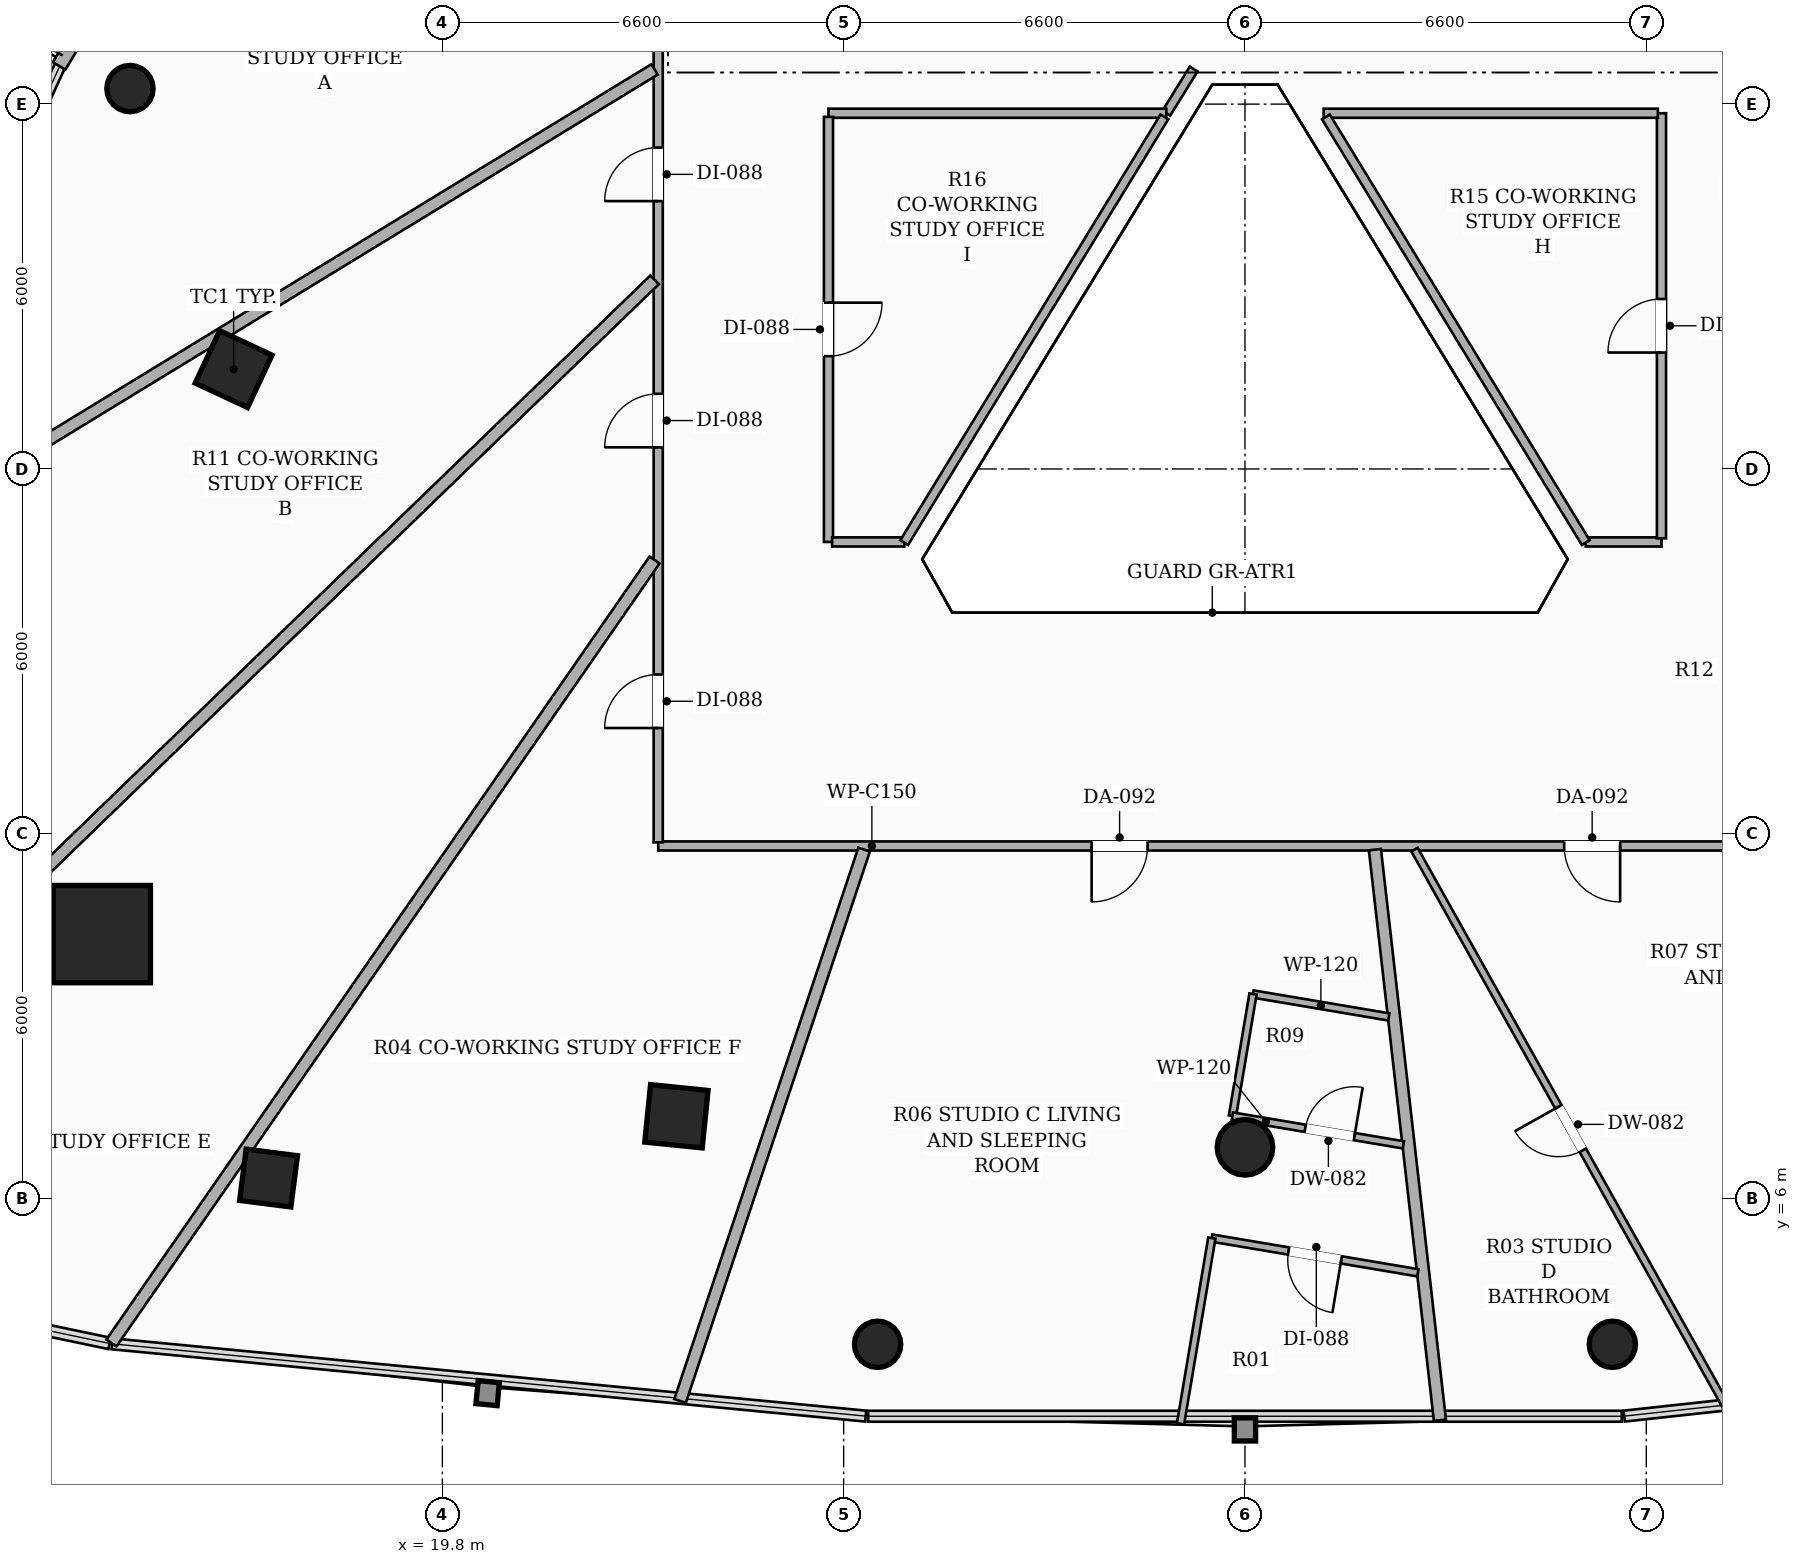
"""IFC4 building model, lengths in metres.
Left out: names, types, materials, properties, quantities, classifications, styles, units other than length and angle.
Written with IfcOpenShell. Run it as: python <this file> out.ifc"""

import sys

from ifc_helpers import new_model, si_unit, direction, frame, frame_2d, origin, origin_2d, place, context, subcontext, project, spatial, rectangle, hollow_rectangle, hollow_circle, extrude, element, fill, save


model = new_model("IFC4")
c1 = context("Model", 3, precision=1e-05, world=origin(), true_north=direction((0.0, 1.0)))
c2 = subcontext(c1, "Body", "Model", "MODEL_VIEW")
j1 = project(units=[si_unit("LENGTHUNIT", "METRE"), si_unit("PLANEANGLEUNIT", "RADIAN")], contexts=[c1])
p1 = place(None, origin())
s1 = spatial("IfcSite", under=j1, at=p1, CompositionType="ELEMENT")
p2 = place(p1, origin())
s2 = spatial("IfcBuilding", under=s1, at=p2, CompositionType="ELEMENT")
p3 = place(p2, frame((0.0, 0.0, 90.65)))
s3 = spatial("IfcBuildingStorey", under=s2, at=p3, CompositionType="ELEMENT", Elevation=90.65)
p4 = place(p3, frame((14.199, 10.351, 0.0), z_axis=(0.0, 0.0, 1.0), x_axis=(1.0, 0.0, 0.0)))
e1 = element("IfcColumn", 1, at=p4, inside=s3, PredefinedType="COLUMN", context=c2, shape_type="SweptSolid", body=[
    extrude(hollow_rectangle(XDim=1.6, YDim=1.6, WallThickness=0.05, at=origin_2d()), origin(), (0.0, 0.0, 1.0), 3.3),
])
for number, where, z_axis, x_axis in (
    (2, (16.367, 19.642, 0.0), (0.0, 0.0, 1.0), (0.423, 0.906, 0.0)),
    (3, (23.649, 7.355, 0.0), (0.0, 0.0, 1.0), (-0.995, 0.101, 0.0)),
):
    element("IfcColumn", number, at=place(p3, frame(where, z_axis=z_axis, x_axis=x_axis)), inside=s3, PredefinedType="COLUMN", context=c2, shape_type="SweptSolid", body=[
        extrude(hollow_rectangle(XDim=0.95, YDim=0.95, WallThickness=0.032, at=origin_2d()), origin(), (0.0, 0.0, 1.0), 3.3),
    ])
p5 = place(p3, frame((33.0, 6.844, 0.0), z_axis=(0.0, 0.0, 1.0), x_axis=(1.0, 0.0, 0.0)))
e4 = element("IfcColumn", 4, at=p5, inside=s3, PredefinedType="COLUMN", context=c2, shape_type="SweptSolid", body=[
    extrude(hollow_circle(Radius=0.457, WallThickness=0.025, at=origin_2d()), origin(), (0.0, 0.0, 1.0), 3.3),
])
p6 = place(p3, frame((16.941, 6.339, 0.0), z_axis=(0.0, 0.0, 1.0), x_axis=(-0.99189444259, 0.127064608601, 0.0)))
e5 = element("IfcColumn", 5, at=p6, inside=s3, PredefinedType="COLUMN", context=c2, shape_type="SweptSolid", body=[
    extrude(hollow_rectangle(XDim=0.85, YDim=0.85, WallThickness=0.028, at=origin_2d()), origin(), (0.0, 0.0, 1.0), 3.3),
])
for number, where, z_axis, x_axis in (
    (6, (14.662, 24.256, 0.0), (0.0, 0.0, 1.0), (1.0, 0.0, 0.0)),
    (7, (26.958, 3.605, 0.0), (0.0, 0.0, 1.0), (1.0, 0.0, 0.0)),
    (8, (39.042, 3.605, 0.0), (0.0, 0.0, 1.0), (1.0, 0.0, 0.0)),
):
    element("IfcColumn", number, at=place(p3, frame(where, z_axis=z_axis, x_axis=x_axis)), inside=s3, PredefinedType="COLUMN", context=c2, shape_type="SweptSolid", body=[
        extrude(hollow_circle(Radius=0.381, WallThickness=0.022, at=origin_2d()), origin(), (0.0, 0.0, 1.0), 3.3),
    ])
p7 = place(p3, frame((19.783, 35.108, 0.0), z_axis=(0.0, 0.0, 1.0), x_axis=(-0.514369419392, -0.857568714678, 0.0)))
e9 = element("IfcWall", 9, at=p7, inside=s3, PredefinedType="SOLIDWALL", context=c2, shape_type="SweptSolid", body=[
    extrude(rectangle(XDim=12.22, YDim=0.24, at=frame_2d((6.11, 0.0))), origin(), (0.0, 0.0, 1.0), 2.624),
])
p8 = place(p7, frame((9.723, 0.0, 0.0)))
e10 = element("IfcOpeningElement", 10, at=p8, cuts=e9, PredefinedType="OPENING", context=c2, shape_type="SweptSolid", body=[
    extrude(rectangle(XDim=1.8, YDim=2.2, at=frame_2d((0.9, 1.1))), frame((0.0, 0.13, 0.0), z_axis=(0.0, -1.0, 0.0), x_axis=(1.0, 0.0, 0.0)), (0.0, 0.0, 1.0), 0.26),
])
p9 = place(p3, frame((42.59, 11.8, 0.0), z_axis=(0.0, 0.0, 1.0), x_axis=(-1.0, 0.0, 0.0)))
e11 = element("IfcWall", 11, at=p9, inside=s3, PredefinedType="PARTITIONING", context=c2, shape_type="SweptSolid", body=[
    extrude(rectangle(XDim=19.24, YDim=0.15, at=frame_2d((9.62, 0.0))), origin(), (0.0, 0.0, 1.0), 2.669),
])
p10 = place(p9, frame((11.192, 0.0, 0.0)))
e12 = element("IfcOpeningElement", 12, at=p10, cuts=e11, PredefinedType="OPENING", context=c2, shape_type="SweptSolid", body=[
    extrude(rectangle(XDim=0.92, YDim=2.15, at=frame_2d((0.46, 1.075))), frame((0.0, 0.085, 0.0), z_axis=(0.0, -1.0, 0.0), x_axis=(1.0, 0.0, 0.0)), (0.0, 0.0, 1.0), 0.17),
])
p11 = place(p9, frame((3.42, 0.0, 0.0)))
e13 = element("IfcOpeningElement", 13, at=p11, cuts=e11, PredefinedType="OPENING", context=c2, shape_type="SweptSolid", body=[
    extrude(rectangle(XDim=0.92, YDim=2.15, at=frame_2d((0.46, 1.075))), frame((0.0, 0.085, 0.0), z_axis=(0.0, -1.0, 0.0), x_axis=(1.0, 0.0, 0.0)), (0.0, 0.0, 1.0), 0.17),
])
p12 = place(p3, frame((23.35, 11.86, 0.0), z_axis=(0.0, 0.0, 1.0), x_axis=(0.0, 1.0, 0.0)))
e14 = element("IfcWall", 14, at=p12, inside=s3, PredefinedType="PARTITIONING", context=c2, shape_type="SweptSolid", body=[
    extrude(rectangle(XDim=25.04, YDim=0.15, at=frame_2d((12.52, 0.0))), origin(), (0.0, 0.0, 1.0), 2.413),
])
p13 = place(p12, frame((18.285, 0.0, 0.0)))
e15 = element("IfcOpeningElement", 15, at=p13, cuts=e14, PredefinedType="OPENING", context=c2, shape_type="SweptSolid", body=[
    extrude(rectangle(XDim=0.88, YDim=2.1, at=frame_2d((0.44, 1.05))), frame((0.0, 0.085, 0.0), z_axis=(0.0, -1.0, 0.0), x_axis=(1.0, 0.0, 0.0)), (0.0, 0.0, 1.0), 0.17),
])
p14 = place(p12, frame((10.545, 0.0, 0.0)))
e16 = element("IfcOpeningElement", 16, at=p14, cuts=e14, PredefinedType="OPENING", context=c2, shape_type="SweptSolid", body=[
    extrude(rectangle(XDim=0.88, YDim=2.1, at=frame_2d((0.44, 1.05))), frame((0.0, 0.085, 0.0), z_axis=(0.0, -1.0, 0.0), x_axis=(1.0, 0.0, 0.0)), (0.0, 0.0, 1.0), 0.17),
])
p15 = place(p12, frame((6.496, 0.0, 0.0)))
e17 = element("IfcOpeningElement", 17, at=p15, cuts=e14, PredefinedType="OPENING", context=c2, shape_type="SweptSolid", body=[
    extrude(rectangle(XDim=0.88, YDim=2.1, at=frame_2d((0.44, 1.05))), frame((0.0, 0.085, 0.0), z_axis=(0.0, -1.0, 0.0), x_axis=(1.0, 0.0, 0.0)), (0.0, 0.0, 1.0), 0.17),
])
p16 = place(p12, frame((1.88, 0.0, 0.0)))
e18 = element("IfcOpeningElement", 18, at=p16, cuts=e14, PredefinedType="OPENING", context=c2, shape_type="SweptSolid", body=[
    extrude(rectangle(XDim=0.88, YDim=2.1, at=frame_2d((0.44, 1.05))), frame((0.0, 0.085, 0.0), z_axis=(0.0, -1.0, 0.0), x_axis=(1.0, 0.0, 0.0)), (0.0, 0.0, 1.0), 0.17),
])
p17 = place(p3, frame((32.156, 24.577, 0.0), z_axis=(0.0, 0.0, 1.0), x_axis=(-0.526374279241, -0.850252973034, 0.0)))
e19 = element("IfcWall", 19, at=p17, inside=s3, PredefinedType="PARTITIONING", context=c2, shape_type="SweptSolid", body=[
    extrude(rectangle(XDim=0.855, YDim=0.15, at=frame_2d((0.427, 0.0))), origin(), (0.0, 0.0, 1.0), 3.06),
])
p18 = place(p3, frame((31.706, 23.85, 0.0), z_axis=(0.0, 0.0, 1.0), x_axis=(-1.0, 0.0, 0.0)))
e20 = element("IfcWall", 20, at=p18, inside=s3, PredefinedType="PARTITIONING", context=c2, shape_type="SweptSolid", body=[
    extrude(rectangle(XDim=5.556, YDim=0.15, at=frame_2d((2.778, 0.0))), origin(), (0.0, 0.0, 1.0), 2.669),
])
p19 = place(p3, frame((26.15, 23.79, 0.0), z_axis=(0.0, 0.0, 1.0), x_axis=(0.0, -1.0, 0.0)))
e21 = element("IfcWall", 21, at=p19, inside=s3, PredefinedType="PARTITIONING", context=c2, shape_type="SweptSolid", body=[
    extrude(rectangle(XDim=6.99, YDim=0.15, at=frame_2d((3.495, 0.0))), origin(), (0.0, 0.0, 1.0), 2.669),
])
p20 = place(p19, frame((3.055, 0.0, 0.0)))
e22 = element("IfcOpeningElement", 22, at=p20, cuts=e21, PredefinedType="OPENING", context=c2, shape_type="SweptSolid", body=[
    extrude(rectangle(XDim=0.88, YDim=2.1, at=frame_2d((0.44, 1.05))), frame((0.0, 0.085, 0.0), z_axis=(0.0, -1.0, 0.0), x_axis=(1.0, 0.0, 0.0)), (0.0, 0.0, 1.0), 0.17),
])
p21 = place(p3, frame((26.21, 16.8, 0.0), z_axis=(0.0, 0.0, 1.0), x_axis=(1.0, 0.0, 0.0)))
e23 = element("IfcWall", 23, at=p21, inside=s3, PredefinedType="PARTITIONING", context=c2, shape_type="SweptSolid", body=[
    extrude(rectangle(XDim=1.186, YDim=0.15, at=frame_2d((0.593, 0.0))), origin(), (0.0, 0.0, 1.0), 3.06),
])
p22 = place(p3, frame((38.604, 16.8, 0.0), z_axis=(0.0, 0.0, 1.0), x_axis=(1.0, 0.0, 0.0)))
e24 = element("IfcWall", 24, at=p22, inside=s3, PredefinedType="PARTITIONING", context=c2, shape_type="SweptSolid", body=[
    extrude(rectangle(XDim=1.246, YDim=0.15, at=frame_2d((0.623, 0.0))), origin(), (0.0, 0.0, 1.0), 3.06),
])
p23 = place(p3, frame((39.85, 16.86, 0.0), z_axis=(0.0, 0.0, 1.0), x_axis=(0.0, 1.0, 0.0)))
e25 = element("IfcWall", 25, at=p23, inside=s3, PredefinedType="PARTITIONING", context=c2, shape_type="SweptSolid", body=[
    extrude(rectangle(XDim=6.99, YDim=0.15, at=frame_2d((3.495, 0.0))), origin(), (0.0, 0.0, 1.0), 2.669),
])
p24 = place(p23, frame((3.055, 0.0, 0.0)))
e26 = element("IfcOpeningElement", 26, at=p24, cuts=e25, PredefinedType="OPENING", context=c2, shape_type="SweptSolid", body=[
    extrude(rectangle(XDim=0.88, YDim=2.1, at=frame_2d((0.44, 1.05))), frame((0.0, 0.085, 0.0), z_axis=(0.0, -1.0, 0.0), x_axis=(1.0, 0.0, 0.0)), (0.0, 0.0, 1.0), 0.17),
])
p25 = place(p3, frame((39.79, 23.85, 0.0), z_axis=(0.0, 0.0, 1.0), x_axis=(-1.0, 0.0, 0.0)))
e27 = element("IfcWall", 27, at=p25, inside=s3, PredefinedType="PARTITIONING", context=c2, shape_type="SweptSolid", body=[
    extrude(rectangle(XDim=5.496, YDim=0.15, at=frame_2d((2.748, 0.0))), origin(), (0.0, 0.0, 1.0), 2.669),
])
p26 = place(p3, frame((27.396, 16.79, 0.0), z_axis=(0.0, 0.0, 1.0), x_axis=(0.521563150989, 0.8532126813, 0.0)))
e28 = element("IfcWall", 28, at=p26, inside=s3, PredefinedType="PARTITIONING", context=c2, shape_type="SweptSolid", body=[
    extrude(rectangle(XDim=8.204, YDim=0.15, at=frame_2d((4.102, 0.0))), origin(), (0.0, 0.0, 1.0), 2.669),
])
p27 = place(p3, frame((34.331, 23.79, 0.0), z_axis=(0.0, 0.0, 1.0), x_axis=(0.52102126657, -0.853543695297, 0.0)))
e29 = element("IfcWall", 29, at=p27, inside=s3, PredefinedType="PARTITIONING", context=c2, shape_type="SweptSolid", body=[
    extrude(rectangle(XDim=8.201, YDim=0.15, at=frame_2d((4.101, 0.0))), origin(), (0.0, 0.0, 1.0), 2.669),
])
p28 = place(p3, frame((23.29, 24.571, 0.0), z_axis=(0.0, 0.0, 1.0), x_axis=(-0.85350412057, -0.521086092858, 0.0)))
e30 = element("IfcWall", 30, at=p28, inside=s3, PredefinedType="PARTITIONING", context=c2, shape_type="SweptSolid", body=[
    extrude(rectangle(XDim=16.23, YDim=0.2, at=frame_2d((8.115, 0.0))), origin(), (0.0, 0.0, 1.0), 2.413),
])
p29 = place(p3, frame((23.29, 21.11, 0.0), z_axis=(0.0, 0.0, 1.0), x_axis=(-0.718846392138, -0.695168946739, 0.0)))
e31 = element("IfcWall", 31, at=p29, inside=s3, PredefinedType="PARTITIONING", context=c2, shape_type="SweptSolid", body=[
    extrude(rectangle(XDim=22.973, YDim=0.2, at=frame_2d((11.487, 0.0))), origin(), (0.0, 0.0, 1.0), 2.413),
])
p30 = place(p3, frame((35.137, 11.74, 0.0), z_axis=(0.0, 0.0, 1.0), x_axis=(0.113194461651, -0.993572852815, 0.0)))
e32 = element("IfcWall", 32, at=p30, inside=s3, PredefinedType="PARTITIONING", context=c2, shape_type="SweptSolid", body=[
    extrude(rectangle(XDim=9.445, YDim=0.2, at=frame_2d((4.722, 0.0))), origin(), (0.0, 0.0, 1.0), 2.413),
])
p31 = place(p3, frame((23.709, 2.673, 0.0), z_axis=(0.0, 0.0, 1.0), x_axis=(0.316679801448, 0.948532499894, 0.0)))
e33 = element("IfcWall", 33, at=p31, inside=s3, PredefinedType="PARTITIONING", context=c2, shape_type="SweptSolid", body=[
    extrude(rectangle(XDim=9.559, YDim=0.2, at=frame_2d((4.779, 0.0))), origin(), (0.0, 0.0, 1.0), 2.413),
])
p32 = place(p3, frame((23.29, 16.503, 0.0), z_axis=(0.0, 0.0, 1.0), x_axis=(-0.57002789499, -0.821625339759, 0.0)))
e34 = element("IfcWall", 34, at=p32, inside=s3, PredefinedType="PARTITIONING", context=c2, shape_type="SweptSolid", body=[
    extrude(rectangle(XDim=15.671, YDim=0.2, at=frame_2d((7.836, 0.0))), origin(), (0.0, 0.0, 1.0), 2.413),
])
p33 = place(p3, frame((35.365, 8.989, 0.0), z_axis=(0.0, 0.0, 1.0), x_axis=(-0.986047933852, 0.166461623646, 0.0)))
e35 = element("IfcWall", 35, at=p33, inside=s3, PredefinedType="PARTITIONING", context=c2, shape_type="SweptSolid", body=[
    extrude(rectangle(XDim=2.264, YDim=0.12, at=frame_2d((1.132, 0.0))), origin(), (0.0, 0.0, 1.0), 2.669),
])
p34 = place(p3, frame((33.132, 9.366, 0.0), z_axis=(0.0, 0.0, 1.0), x_axis=(-0.166129895483, -0.986103877807, 0.0)))
e36 = element("IfcWall", 36, at=p34, inside=s3, PredefinedType="PARTITIONING", context=c2, shape_type="SweptSolid", body=[
    extrude(rectangle(XDim=2.035, YDim=0.12, at=frame_2d((1.018, 0.0))), origin(), (0.0, 0.0, 1.0), 2.669),
])
p35 = place(p3, frame((32.794, 7.359, 0.0), z_axis=(0.0, 0.0, 1.0), x_axis=(0.986086685245, -0.166231913849, 0.0)))
e37 = element("IfcWall", 37, at=p35, inside=s3, PredefinedType="PARTITIONING", context=c2, shape_type="SweptSolid", body=[
    extrude(rectangle(XDim=2.851, YDim=0.12, at=frame_2d((1.425, 0.0))), origin(), (0.0, 0.0, 1.0), 2.669),
])
p36 = place(p35, frame((1.214, 0.0, 0.0)))
e38 = element("IfcOpeningElement", 38, at=p36, cuts=e37, PredefinedType="OPENING", context=c2, shape_type="SweptSolid", body=[
    extrude(rectangle(XDim=0.82, YDim=2.1, at=frame_2d((0.41, 1.05))), frame((0.0, 0.07, 0.0), z_axis=(0.0, -1.0, 0.0), x_axis=(1.0, 0.0, 0.0)), (0.0, 0.0, 1.0), 0.14),
])
p37 = place(p3, frame((35.844, 4.781, 0.0), z_axis=(0.0, 0.0, 1.0), x_axis=(-0.986098591399, 0.166161271182, 0.0)))
e39 = element("IfcWall", 39, at=p37, inside=s3, PredefinedType="PARTITIONING", context=c2, shape_type="SweptSolid", body=[
    extrude(rectangle(XDim=3.437, YDim=0.12, at=frame_2d((1.718, 0.0))), origin(), (0.0, 0.0, 1.0), 3.06),
])
p38 = place(p37, frame((1.278, 0.0, 0.0)))
e40 = element("IfcOpeningElement", 40, at=p38, cuts=e39, PredefinedType="OPENING", context=c2, shape_type="SweptSolid", body=[
    extrude(rectangle(XDim=0.88, YDim=2.1, at=frame_2d((0.44, 1.05))), frame((0.0, 0.07, 0.0), z_axis=(0.0, -1.0, 0.0), x_axis=(1.0, 0.0, 0.0)), (0.0, 0.0, 1.0), 0.14),
])
p39 = place(p3, frame((32.455, 5.352, 0.0), z_axis=(0.0, 0.0, 1.0), x_axis=(-0.166328914583, -0.986070328209, 0.0)))
e41 = element("IfcWall", 41, at=p39, inside=s3, PredefinedType="PARTITIONING", context=c2, shape_type="SweptSolid", body=[
    extrude(rectangle(XDim=3.097, YDim=0.12, at=frame_2d((1.549, 0.0))), origin(), (0.0, 0.0, 1.0), 3.06),
])
p40 = place(p3, frame((40.923, 2.567, 0.0), z_axis=(0.0, 0.0, 1.0), x_axis=(-0.4884640488, 0.872584020613, 0.0)))
e42 = element("IfcWall", 42, at=p40, inside=s3, PredefinedType="PARTITIONING", context=c2, shape_type="SweptSolid", body=[
    extrude(rectangle(XDim=10.512, YDim=0.12, at=frame_2d((5.256, 0.0))), origin(), (0.0, 0.0, 1.0), 2.413),
])
p41 = place(p40, frame((4.846, 0.0, 0.0)))
e43 = element("IfcOpeningElement", 43, at=p41, cuts=e42, PredefinedType="OPENING", context=c2, shape_type="SweptSolid", body=[
    extrude(rectangle(XDim=0.82, YDim=2.1, at=frame_2d((0.41, 1.05))), frame((0.0, 0.07, 0.0), z_axis=(0.0, -1.0, 0.0), x_axis=(1.0, 0.0, 0.0)), (0.0, 0.0, 1.0), 0.14),
])
p42 = place(p14, origin())
e44 = element("IfcDoor", 44, at=p42, inside=s3, OperationType="SINGLE_SWING_LEFT", PredefinedType="DOOR", context=c2, shape_type="SweptSolid", body=[
    extrude(rectangle(XDim=0.88, YDim=2.1, at=frame_2d((0.44, 1.05))), frame((0.0, 0.025, 0.0), z_axis=(0.0, -1.0, 0.0), x_axis=(1.0, 0.0, 0.0)), (0.0, 0.0, 1.0), 0.05),
])
fill(e16, e44)
p43 = place(p10, origin())
e45 = element("IfcDoor", 45, at=p43, inside=s3, OperationType="SINGLE_SWING_RIGHT", PredefinedType="DOOR", context=c2, shape_type="SweptSolid", body=[
    extrude(rectangle(XDim=0.92, YDim=2.15, at=frame_2d((0.46, 1.075))), frame((0.0, 0.025, 0.0), z_axis=(0.0, -1.0, 0.0), x_axis=(1.0, 0.0, 0.0)), (0.0, 0.0, 1.0), 0.05),
])
fill(e12, e45)
p44 = place(p36, origin())
e46 = element("IfcDoor", 46, at=p44, inside=s3, OperationType="SINGLE_SWING_RIGHT", PredefinedType="DOOR", context=c2, shape_type="SweptSolid", body=[
    extrude(rectangle(XDim=0.82, YDim=2.1, at=frame_2d((0.41, 1.05))), frame((0.0, 0.025, 0.0), z_axis=(0.0, -1.0, 0.0), x_axis=(1.0, 0.0, 0.0)), (0.0, 0.0, 1.0), 0.05),
])
fill(e38, e46)
p45 = place(p38, origin())
e47 = element("IfcDoor", 47, at=p45, inside=s3, OperationType="SINGLE_SWING_LEFT", PredefinedType="DOOR", context=c2, shape_type="SweptSolid", body=[
    extrude(rectangle(XDim=0.88, YDim=2.1, at=frame_2d((0.44, 1.05))), frame((0.0, 0.025, 0.0), z_axis=(0.0, -1.0, 0.0), x_axis=(1.0, 0.0, 0.0)), (0.0, 0.0, 1.0), 0.05),
])
fill(e40, e47)
p46 = place(p11, origin())
e48 = element("IfcDoor", 48, at=p46, inside=s3, OperationType="SINGLE_SWING_LEFT", PredefinedType="DOOR", context=c2, shape_type="SweptSolid", body=[
    extrude(rectangle(XDim=0.92, YDim=2.15, at=frame_2d((0.46, 1.075))), frame((0.0, 0.025, 0.0), z_axis=(0.0, -1.0, 0.0), x_axis=(1.0, 0.0, 0.0)), (0.0, 0.0, 1.0), 0.05),
])
fill(e13, e48)
p47 = place(p41, origin())
e49 = element("IfcDoor", 49, at=p47, inside=s3, OperationType="SINGLE_SWING_RIGHT", PredefinedType="DOOR", context=c2, shape_type="SweptSolid", body=[
    extrude(rectangle(XDim=0.82, YDim=2.1, at=frame_2d((0.41, 1.05))), frame((0.0, 0.025, 0.0), z_axis=(0.0, -1.0, 0.0), x_axis=(1.0, 0.0, 0.0)), (0.0, 0.0, 1.0), 0.05),
])
fill(e43, e49)
p48 = place(p15, origin())
e50 = element("IfcDoor", 50, at=p48, inside=s3, OperationType="SINGLE_SWING_LEFT", PredefinedType="DOOR", context=c2, shape_type="SweptSolid", body=[
    extrude(rectangle(XDim=0.88, YDim=2.1, at=frame_2d((0.44, 1.05))), frame((0.0, 0.025, 0.0), z_axis=(0.0, -1.0, 0.0), x_axis=(1.0, 0.0, 0.0)), (0.0, 0.0, 1.0), 0.05),
])
fill(e17, e50)
p49 = place(p16, origin())
e51 = element("IfcDoor", 51, at=p49, inside=s3, OperationType="SINGLE_SWING_LEFT", PredefinedType="DOOR", context=c2, shape_type="SweptSolid", body=[
    extrude(rectangle(XDim=0.88, YDim=2.1, at=frame_2d((0.44, 1.05))), frame((0.0, 0.025, 0.0), z_axis=(0.0, -1.0, 0.0), x_axis=(1.0, 0.0, 0.0)), (0.0, 0.0, 1.0), 0.05),
])
fill(e18, e51)
p50 = place(p24, origin())
e52 = element("IfcDoor", 52, at=p50, inside=s3, OperationType="SINGLE_SWING_LEFT", PredefinedType="DOOR", context=c2, shape_type="SweptSolid", body=[
    extrude(rectangle(XDim=0.88, YDim=2.1, at=frame_2d((0.44, 1.05))), frame((0.0, 0.025, 0.0), z_axis=(0.0, -1.0, 0.0), x_axis=(1.0, 0.0, 0.0)), (0.0, 0.0, 1.0), 0.05),
])
fill(e26, e52)
p51 = place(p20, origin())
e53 = element("IfcDoor", 53, at=p51, inside=s3, OperationType="SINGLE_SWING_LEFT", PredefinedType="DOOR", context=c2, shape_type="SweptSolid", body=[
    extrude(rectangle(XDim=0.88, YDim=2.1, at=frame_2d((0.44, 1.05))), frame((0.0, 0.025, 0.0), z_axis=(0.0, -1.0, 0.0), x_axis=(1.0, 0.0, 0.0)), (0.0, 0.0, 1.0), 0.05),
])
fill(e22, e53)
save(model, sys.argv[1])
